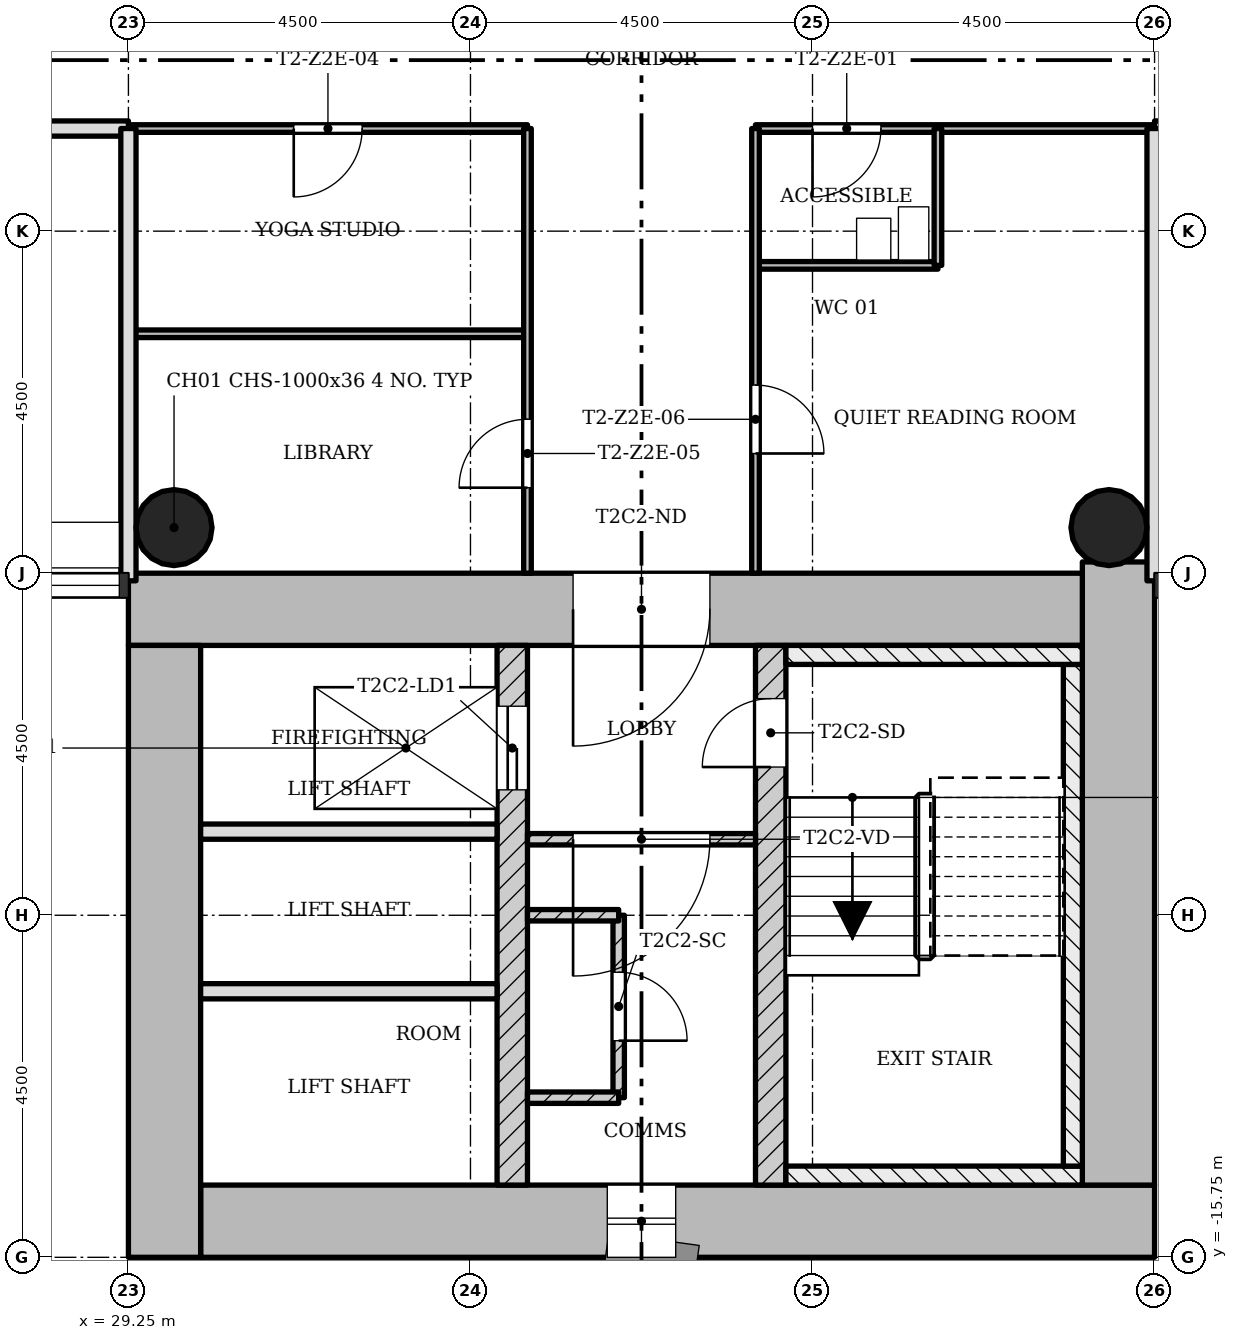
"""IFC4 building model, lengths in metres.
Left out: names, types, materials, properties, quantities, classifications, styles, units other than length and angle.
Written with IfcOpenShell. Run it as: python <this file> out.ifc"""

import sys

from ifc_helpers import new_model, si_unit, direction, frame, frame_2d, origin, origin_2d, place, context, subcontext, project, spatial, rectangle, hollow_circle, extrude, element, fill, save


model = new_model("IFC4")
c1 = context("Model", 3, precision=1e-05, world=origin(), true_north=direction((0.0, 1.0)))
c2 = subcontext(c1, "Body", "Model", "MODEL_VIEW")
j1 = project(units=[si_unit("LENGTHUNIT", "METRE"), si_unit("PLANEANGLEUNIT", "RADIAN")], contexts=[c1])
p1 = place(None, origin())
s1 = spatial("IfcSite", under=j1, at=p1, CompositionType="ELEMENT")
p2 = place(p1, origin())
s2 = spatial("IfcBuilding", under=s1, at=p2, CompositionType="ELEMENT")
p3 = place(p2, frame((0.0, 0.0, 100.4)))
s3 = spatial("IfcBuildingStorey", under=s2, at=p3, CompositionType="ELEMENT", Elevation=100.4)
p4 = place(p3, frame((30.2, -15.275, 0.0), z_axis=(0.0, 0.0, 1.0), x_axis=(1.0, 0.0, 0.0)))
e1 = element("IfcWall", 1, at=p4, inside=s3, PredefinedType="SHEAR", context=c2, shape_type="SweptSolid", body=[
    extrude(rectangle(XDim=12.55, YDim=0.95, at=frame_2d((6.275, 0.0))), origin(), (0.0, 0.0, 1.0), 3.4),
])
p5 = place(p4, frame((5.35, 0.0, 0.45)))
e2 = element("IfcOpeningElement", 2, at=p5, cuts=e1, PredefinedType="OPENING", context=c2, shape_type="SweptSolid", body=[
    extrude(rectangle(XDim=0.9, YDim=2.4, at=frame_2d((0.45, 1.2))), frame((0.0, 0.485, 0.0), z_axis=(0.0, -1.0, 0.0), x_axis=(1.0, 0.0, 0.0)), (0.0, 0.0, 1.0), 0.97),
])
p6 = place(p3, frame((42.275, -14.8, 0.0), z_axis=(0.0, 0.0, 1.0), x_axis=(0.0, 1.0, 0.0)))
e3 = element("IfcWall", 3, at=p6, inside=s3, PredefinedType="SHEAR", context=c2, shape_type="SweptSolid", body=[
    extrude(rectangle(XDim=8.198, YDim=0.95, at=frame_2d((4.099, 0.0))), origin(), (0.0, 0.0, 1.0), 3.4),
])
p7 = place(p3, frame((41.8, -7.225, 0.0), z_axis=(0.0, 0.0, 1.0), x_axis=(-1.0, 0.0, 0.0)))
e4 = element("IfcWall", 4, at=p7, inside=s3, PredefinedType="SHEAR", context=c2, shape_type="SweptSolid", body=[
    extrude(rectangle(XDim=12.55, YDim=0.95, at=frame_2d((6.275, 0.0))), origin(), (0.0, 0.0, 1.0), 3.4),
])
p8 = place(p7, frame((4.9, 0.0, 0.0)))
e5 = element("IfcOpeningElement", 5, at=p8, cuts=e4, PredefinedType="OPENING", context=c2, shape_type="SweptSolid", body=[
    extrude(rectangle(XDim=1.8, YDim=2.1, at=frame_2d((0.9, 1.05))), frame((0.0, 0.485, 0.0), z_axis=(0.0, -1.0, 0.0), x_axis=(1.0, 0.0, 0.0)), (0.0, 0.0, 1.0), 0.97),
])
p9 = place(p3, frame((29.725, -7.7, 0.0), z_axis=(0.0, 0.0, 1.0), x_axis=(0.0, -1.0, 0.0)))
e6 = element("IfcWall", 6, at=p9, inside=s3, PredefinedType="SHEAR", context=c2, shape_type="SweptSolid", body=[
    extrude(rectangle(XDim=8.05, YDim=0.95, at=frame_2d((4.025, 0.0))), origin(), (0.0, 0.0, 1.0), 3.4),
])
p10 = place(p3, frame((34.3, -14.8, 0.0), z_axis=(0.0, 0.0, 1.0), x_axis=(0.0, 1.0, 0.0)))
e7 = element("IfcWall", 7, at=p10, inside=s3, PredefinedType="SHEAR", context=c2, shape_type="SweptSolid", body=[
    extrude(rectangle(XDim=7.1, YDim=0.4, at=frame_2d((3.55, 0.0))), origin(), (0.0, 0.0, 1.0), 3.4),
])
p11 = place(p10, frame((5.2, 0.0, 0.0)))
e8 = element("IfcOpeningElement", 8, at=p11, cuts=e7, PredefinedType="OPENING", context=c2, shape_type="SweptSolid", body=[
    extrude(rectangle(XDim=1.1, YDim=2.1, at=frame_2d((0.55, 1.05))), frame((0.0, 0.21, 0.0), z_axis=(0.0, -1.0, 0.0), x_axis=(1.0, 0.0, 0.0)), (0.0, 0.0, 1.0), 0.42),
])
p12 = place(p3, frame((37.7, -14.8, 0.0), z_axis=(0.0, 0.0, 1.0), x_axis=(0.0, 1.0, 0.0)))
e9 = element("IfcWall", 9, at=p12, inside=s3, PredefinedType="SHEAR", context=c2, shape_type="SweptSolid", body=[
    extrude(rectangle(XDim=7.1, YDim=0.4, at=frame_2d((3.55, 0.0))), origin(), (0.0, 0.0, 1.0), 3.4),
])
p13 = place(p12, frame((5.5, 0.0, 0.0)))
e10 = element("IfcOpeningElement", 10, at=p13, cuts=e9, PredefinedType="OPENING", context=c2, shape_type="SweptSolid", body=[
    extrude(rectangle(XDim=0.9, YDim=2.1, at=frame_2d((0.45, 1.05))), frame((0.0, 0.21, 0.0), z_axis=(0.0, -1.0, 0.0), x_axis=(1.0, 0.0, 0.0)), (0.0, 0.0, 1.0), 0.42),
])
for number, where, z_axis, x_axis in (
    (11, (42.15, -6.15, 0.0), (0.0, 0.0, 1.0), (1.0, 0.0, 0.0)),
    (12, (29.85, -6.15, 0.0), (0.0, 0.0, 1.0), (1.0, 0.0, 0.0)),
):
    element("IfcColumn", number, at=place(p3, frame(where, z_axis=z_axis, x_axis=x_axis)), inside=s3, PredefinedType="COLUMN", context=c2, shape_type="SweptSolid", body=[
        extrude(hollow_circle(Radius=0.5, WallThickness=0.036, at=origin_2d()), origin(), (0.0, 0.0, 1.0), 3.4),
    ])
p14 = place(p3, frame((34.5, -10.25, 0.0), z_axis=(0.0, 0.0, 1.0), x_axis=(1.0, 0.0, 0.0)))
e13 = element("IfcWall", 13, at=p14, inside=s3, PredefinedType="PARTITIONING", context=c2, shape_type="SweptSolid", body=[
    extrude(rectangle(XDim=3.0, YDim=0.15, at=frame_2d((1.5, 0.0))), origin(), (0.0, 0.0, 1.0), 3.0),
])
p15 = place(p14, frame((0.6, 0.0, 0.0)))
e14 = element("IfcOpeningElement", 14, at=p15, cuts=e13, PredefinedType="OPENING", context=c2, shape_type="SweptSolid", body=[
    extrude(rectangle(XDim=1.8, YDim=2.1, at=frame_2d((0.9, 1.05))), frame((0.0, 0.085, 0.0), z_axis=(0.0, -1.0, 0.0), x_axis=(1.0, 0.0, 0.0)), (0.0, 0.0, 1.0), 0.17),
])
for number, where, z_axis, x_axis in (
    (15, (30.2, -10.15, 0.0), (0.0, 0.0, 1.0), (1.0, 0.0, 0.0)),
    (16, (30.2, -12.25, 0.0), (0.0, 0.0, 1.0), (1.0, 0.0, 0.0)),
):
    element("IfcWall", number, at=place(p3, frame(where, z_axis=z_axis, x_axis=x_axis)), inside=s3, PredefinedType="SOLIDWALL", context=c2, shape_type="SweptSolid", body=[
        extrude(rectangle(XDim=3.9, YDim=0.2, at=frame_2d((1.95, 0.0))), origin(), (0.0, 0.0, 1.0), 3.0),
    ])
p16 = place(p3, frame((35.7, -11.25, 0.0), z_axis=(0.0, 0.0, 1.0), x_axis=(0.0, -1.0, 0.0)))
e17 = element("IfcWall", 17, at=p16, inside=s3, PredefinedType="PARTITIONING", context=c2, shape_type="SweptSolid", body=[
    extrude(rectangle(XDim=2.4, YDim=0.15, at=frame_2d((1.2, 0.0))), origin(), (0.0, 0.0, 1.0), 3.0),
])
p17 = place(p16, frame((0.75, 0.0, 0.0)))
e18 = element("IfcOpeningElement", 18, at=p17, cuts=e17, PredefinedType="OPENING", context=c2, shape_type="SweptSolid", body=[
    extrude(rectangle(XDim=0.9, YDim=2.1, at=frame_2d((0.45, 1.05))), frame((0.0, 0.085, 0.0), z_axis=(0.0, -1.0, 0.0), x_axis=(1.0, 0.0, 0.0)), (0.0, 0.0, 1.0), 0.17),
])
for number, where, z_axis, x_axis in (
    (19, (35.7, -11.25, 0.0), (0.0, 0.0, 1.0), (-1.0, 0.0, 0.0)),
    (20, (35.7, -13.65, 0.0), (0.0, 0.0, 1.0), (-1.0, 0.0, 0.0)),
):
    element("IfcWall", number, at=place(p3, frame(where, z_axis=z_axis, x_axis=x_axis)), inside=s3, PredefinedType="PARTITIONING", context=c2, shape_type="SweptSolid", body=[
        extrude(rectangle(XDim=1.2, YDim=0.15, at=frame_2d((0.6, 0.0))), origin(), (0.0, 0.0, 1.0), 3.0),
    ])
p18 = place(p3, frame((34.5, -3.6, 0.0), z_axis=(0.0, 0.0, 1.0), x_axis=(-1.0, 0.0, 0.0)))
e21 = element("IfcWall", 21, at=p18, inside=s3, PredefinedType="PARTITIONING", context=c2, shape_type="SweptSolid", body=[
    extrude(rectangle(XDim=5.25, YDim=0.1, at=frame_2d((2.625, 0.0))), origin(), (0.0, 0.0, 1.0), 3.0),
])
p19 = place(p3, frame((39.9, -2.7, 0.0), z_axis=(0.0, 0.0, 1.0), x_axis=(-1.0, 0.0, 0.0)))
e22 = element("IfcWall", 22, at=p19, inside=s3, PredefinedType="PARTITIONING", context=c2, shape_type="SweptSolid", body=[
    extrude(rectangle(XDim=2.4, YDim=0.1, at=frame_2d((1.2, 0.0))), origin(), (0.0, 0.0, 1.0), 3.0),
])
p20 = place(p3, frame((42.75, -0.9, 0.0), z_axis=(0.0, 0.0, 1.0), x_axis=(-1.0, 0.0, 0.0)))
e23 = element("IfcWall", 23, at=p20, inside=s3, PredefinedType="PARTITIONING", context=c2, shape_type="SweptSolid", body=[
    extrude(rectangle(XDim=5.25, YDim=0.1, at=frame_2d((2.625, 0.0))), origin(), (0.0, 0.0, 1.0), 3.0),
])
p21 = place(p20, frame((3.6, 0.0, 0.0)))
e24 = element("IfcOpeningElement", 24, at=p21, cuts=e23, PredefinedType="OPENING", context=c2, shape_type="SweptSolid", body=[
    extrude(rectangle(XDim=0.9, YDim=2.1, at=frame_2d((0.45, 1.05))), frame((0.0, 0.06, 0.0), z_axis=(0.0, -1.0, 0.0), x_axis=(1.0, 0.0, 0.0)), (0.0, 0.0, 1.0), 0.12),
])
p22 = place(p3, frame((34.5, -0.9, 0.0), z_axis=(0.0, 0.0, 1.0), x_axis=(-1.0, 0.0, 0.0)))
e25 = element("IfcWall", 25, at=p22, inside=s3, PredefinedType="PARTITIONING", context=c2, shape_type="SweptSolid", body=[
    extrude(rectangle(XDim=5.25, YDim=0.1, at=frame_2d((2.625, 0.0))), origin(), (0.0, 0.0, 1.0), 3.0),
])
p23 = place(p22, frame((2.175, 0.0, 0.0)))
e26 = element("IfcOpeningElement", 26, at=p23, cuts=e25, PredefinedType="OPENING", context=c2, shape_type="SweptSolid", body=[
    extrude(rectangle(XDim=0.9, YDim=2.1, at=frame_2d((0.45, 1.05))), frame((0.0, 0.06, 0.0), z_axis=(0.0, -1.0, 0.0), x_axis=(1.0, 0.0, 0.0)), (0.0, 0.0, 1.0), 0.12),
])
for number, where, z_axis, x_axis in (
    (27, (44.55, -0.9, 0.0), (0.0, 0.0, 1.0), (-1.0, 0.0, 0.0)),
    (28, (29.25, -0.9, 0.0), (0.0, 0.0, 1.0), (-1.0, 0.0, 0.0)),
):
    element("IfcWall", number, at=place(p3, frame(where, z_axis=z_axis, x_axis=x_axis)), inside=s3, PredefinedType="SOLIDWALL", context=c2, shape_type="SweptSolid", body=[
        extrude(rectangle(XDim=1.8, YDim=0.2, at=frame_2d((0.9, 0.0))), origin(), (0.0, 0.0, 1.0), 3.0),
    ])
p24 = place(p3, frame((42.75, -6.85, 0.0), z_axis=(0.0, 0.0, 1.0), x_axis=(0.0, 1.0, 0.0)))
e29 = element("IfcWall", 29, at=p24, inside=s3, PredefinedType="SOLIDWALL", context=c2, shape_type="SweptSolid", body=[
    extrude(rectangle(XDim=5.95, YDim=0.2, at=frame_2d((2.975, 0.0))), origin(), (0.0, 0.0, 1.0), 3.0),
])
p25 = place(p3, frame((39.9, -2.7, 0.0), z_axis=(0.0, 0.0, 1.0), x_axis=(0.0, 1.0, 0.0)))
e30 = element("IfcWall", 30, at=p25, inside=s3, PredefinedType="PARTITIONING", context=c2, shape_type="SweptSolid", body=[
    extrude(rectangle(XDim=1.8, YDim=0.1, at=frame_2d((0.9, 0.0))), origin(), (0.0, 0.0, 1.0), 3.0),
])
p26 = place(p3, frame((37.5, -6.75, 0.0), z_axis=(0.0, 0.0, 1.0), x_axis=(0.0, 1.0, 0.0)))
e31 = element("IfcWall", 31, at=p26, inside=s3, PredefinedType="PARTITIONING", context=c2, shape_type="SweptSolid", body=[
    extrude(rectangle(XDim=5.85, YDim=0.1, at=frame_2d((2.925, 0.0))), origin(), (0.0, 0.0, 1.0), 3.0),
])
p27 = place(p26, frame((1.575, 0.0, 0.0)))
e32 = element("IfcOpeningElement", 32, at=p27, cuts=e31, PredefinedType="OPENING", context=c2, shape_type="SweptSolid", body=[
    extrude(rectangle(XDim=0.9, YDim=2.1, at=frame_2d((0.45, 1.05))), frame((0.0, 0.06, 0.0), z_axis=(0.0, -1.0, 0.0), x_axis=(1.0, 0.0, 0.0)), (0.0, 0.0, 1.0), 0.12),
])
p28 = place(p3, frame((34.5, -6.75, 0.0), z_axis=(0.0, 0.0, 1.0), x_axis=(0.0, 1.0, 0.0)))
e33 = element("IfcWall", 33, at=p28, inside=s3, PredefinedType="PARTITIONING", context=c2, shape_type="SweptSolid", body=[
    extrude(rectangle(XDim=5.85, YDim=0.1, at=frame_2d((2.925, 0.0))), origin(), (0.0, 0.0, 1.0), 3.0),
])
p29 = place(p28, frame((1.125, 0.0, 0.0)))
e34 = element("IfcOpeningElement", 34, at=p29, cuts=e33, PredefinedType="OPENING", context=c2, shape_type="SweptSolid", body=[
    extrude(rectangle(XDim=0.9, YDim=2.1, at=frame_2d((0.45, 1.05))), frame((0.0, 0.06, 0.0), z_axis=(0.0, -1.0, 0.0), x_axis=(1.0, 0.0, 0.0)), (0.0, 0.0, 1.0), 0.12),
])
p30 = place(p3, frame((29.25, -6.85, 0.0), z_axis=(0.0, 0.0, 1.0), x_axis=(0.0, 1.0, 0.0)))
e35 = element("IfcWall", 35, at=p30, inside=s3, PredefinedType="SOLIDWALL", context=c2, shape_type="SweptSolid", body=[
    extrude(rectangle(XDim=5.95, YDim=0.2, at=frame_2d((2.975, 0.0))), origin(), (0.0, 0.0, 1.0), 3.0),
])
p31 = place(p3, frame((37.9, -14.675, 0.0), z_axis=(0.0, 0.0, 1.0), x_axis=(1.0, 0.0, 0.0)))
e36 = element("IfcWall", 36, at=p31, inside=s3, PredefinedType="SHEAR", context=c2, shape_type="SweptSolid", body=[
    extrude(rectangle(XDim=3.9, YDim=0.25, at=frame_2d((1.95, 0.0))), origin(), (0.0, 0.0, 1.0), 3.4),
])
p32 = place(p3, frame((41.675, -7.95, 0.0), z_axis=(0.0, 0.0, 1.0), x_axis=(0.0, -1.0, 0.0)))
e37 = element("IfcWall", 37, at=p32, inside=s3, PredefinedType="SHEAR", context=c2, shape_type="SweptSolid", body=[
    extrude(rectangle(XDim=6.6, YDim=0.25, at=frame_2d((3.3, 0.0))), origin(), (0.0, 0.0, 1.0), 3.4),
])
p33 = place(p3, frame((37.9, -7.825, 0.0), z_axis=(0.0, 0.0, 1.0), x_axis=(1.0, 0.0, 0.0)))
e38 = element("IfcWall", 38, at=p33, inside=s3, PredefinedType="SHEAR", context=c2, shape_type="SweptSolid", body=[
    extrude(rectangle(XDim=3.9, YDim=0.25, at=frame_2d((1.95, 0.0))), origin(), (0.0, 0.0, 1.0), 3.4),
])
p34 = place(p5, origin())
e39 = element("IfcWindow", 39, at=p34, inside=s3, PartitioningType="SINGLE_PANEL", PredefinedType="WINDOW", context=c2, shape_type="SweptSolid", body=[
    extrude(rectangle(XDim=0.9, YDim=2.4, at=frame_2d((0.45, 1.2))), frame((0.0, 0.03, 0.0), z_axis=(0.0, -1.0, 0.0), x_axis=(1.0, 0.0, 0.0)), (0.0, 0.0, 1.0), 0.06),
])
fill(e2, e39)
p35 = place(p15, origin())
e40 = element("IfcDoor", 40, at=p35, inside=s3, OperationType="SINGLE_SWING_LEFT", PredefinedType="DOOR", context=c2, shape_type="SweptSolid", body=[
    extrude(rectangle(XDim=1.8, YDim=2.1, at=frame_2d((0.9, 1.05))), frame((0.0, 0.025, 0.0), z_axis=(0.0, -1.0, 0.0), x_axis=(1.0, 0.0, 0.0)), (0.0, 0.0, 1.0), 0.05),
])
fill(e14, e40)
p36 = place(p17, origin())
e41 = element("IfcDoor", 41, at=p36, inside=s3, OperationType="SINGLE_SWING_LEFT", PredefinedType="DOOR", context=c2, shape_type="SweptSolid", body=[
    extrude(rectangle(XDim=0.9, YDim=2.1, at=frame_2d((0.45, 1.05))), frame((0.0, 0.025, 0.0), z_axis=(0.0, -1.0, 0.0), x_axis=(1.0, 0.0, 0.0)), (0.0, 0.0, 1.0), 0.05),
])
fill(e18, e41)
p37 = place(p21, origin())
e42 = element("IfcDoor", 42, at=p37, inside=s3, OperationType="SINGLE_SWING_LEFT", PredefinedType="DOOR", context=c2, shape_type="SweptSolid", body=[
    extrude(rectangle(XDim=0.9, YDim=2.1, at=frame_2d((0.45, 1.05))), frame((0.0, 0.025, 0.0), z_axis=(0.0, -1.0, 0.0), x_axis=(1.0, 0.0, 0.0)), (0.0, 0.0, 1.0), 0.05),
])
fill(e24, e42)
p38 = place(p23, origin())
e43 = element("IfcDoor", 43, at=p38, inside=s3, OperationType="SINGLE_SWING_LEFT", PredefinedType="DOOR", context=c2, shape_type="SweptSolid", body=[
    extrude(rectangle(XDim=0.9, YDim=2.1, at=frame_2d((0.45, 1.05))), frame((0.0, 0.025, 0.0), z_axis=(0.0, -1.0, 0.0), x_axis=(1.0, 0.0, 0.0)), (0.0, 0.0, 1.0), 0.05),
])
fill(e26, e43)
p39 = place(p29, origin())
e44 = element("IfcDoor", 44, at=p39, inside=s3, OperationType="SINGLE_SWING_RIGHT", PredefinedType="DOOR", context=c2, shape_type="SweptSolid", body=[
    extrude(rectangle(XDim=0.9, YDim=2.1, at=frame_2d((0.45, 1.05))), frame((0.0, 0.025, 0.0), z_axis=(0.0, -1.0, 0.0), x_axis=(1.0, 0.0, 0.0)), (0.0, 0.0, 1.0), 0.05),
])
fill(e34, e44)
p40 = place(p27, origin())
e45 = element("IfcDoor", 45, at=p40, inside=s3, OperationType="SINGLE_SWING_LEFT", PredefinedType="DOOR", context=c2, shape_type="SweptSolid", body=[
    extrude(rectangle(XDim=0.9, YDim=2.1, at=frame_2d((0.45, 1.05))), frame((0.0, 0.025, 0.0), z_axis=(0.0, -1.0, 0.0), x_axis=(1.0, 0.0, 0.0)), (0.0, 0.0, 1.0), 0.05),
])
fill(e32, e45)
p41 = place(p13, origin())
e46 = element("IfcDoor", 46, at=p41, inside=s3, OperationType="SINGLE_SWING_RIGHT", PredefinedType="DOOR", context=c2, shape_type="SweptSolid", body=[
    extrude(rectangle(XDim=0.9, YDim=2.1, at=frame_2d((0.45, 1.05))), frame((0.0, 0.025, 0.0), z_axis=(0.0, -1.0, 0.0), x_axis=(1.0, 0.0, 0.0)), (0.0, 0.0, 1.0), 0.05),
])
fill(e10, e46)
p42 = place(p11, origin())
e47 = element("IfcDoor", 47, at=p42, inside=s3, OperationType="SLIDING_TO_LEFT", PredefinedType="DOOR", context=c2, shape_type="SweptSolid", body=[
    extrude(rectangle(XDim=1.1, YDim=2.1, at=frame_2d((0.55, 1.05))), frame((0.0, 0.025, 0.0), z_axis=(0.0, -1.0, 0.0), x_axis=(1.0, 0.0, 0.0)), (0.0, 0.0, 1.0), 0.05),
])
fill(e8, e47)
p43 = place(p8, origin())
e48 = element("IfcDoor", 48, at=p43, inside=s3, OperationType="SINGLE_SWING_LEFT", PredefinedType="DOOR", context=c2, shape_type="SweptSolid", body=[
    extrude(rectangle(XDim=1.8, YDim=2.1, at=frame_2d((0.9, 1.05))), frame((0.0, 0.025, 0.0), z_axis=(0.0, -1.0, 0.0), x_axis=(1.0, 0.0, 0.0)), (0.0, 0.0, 1.0), 0.05),
])
fill(e5, e48)
save(model, sys.argv[1])
